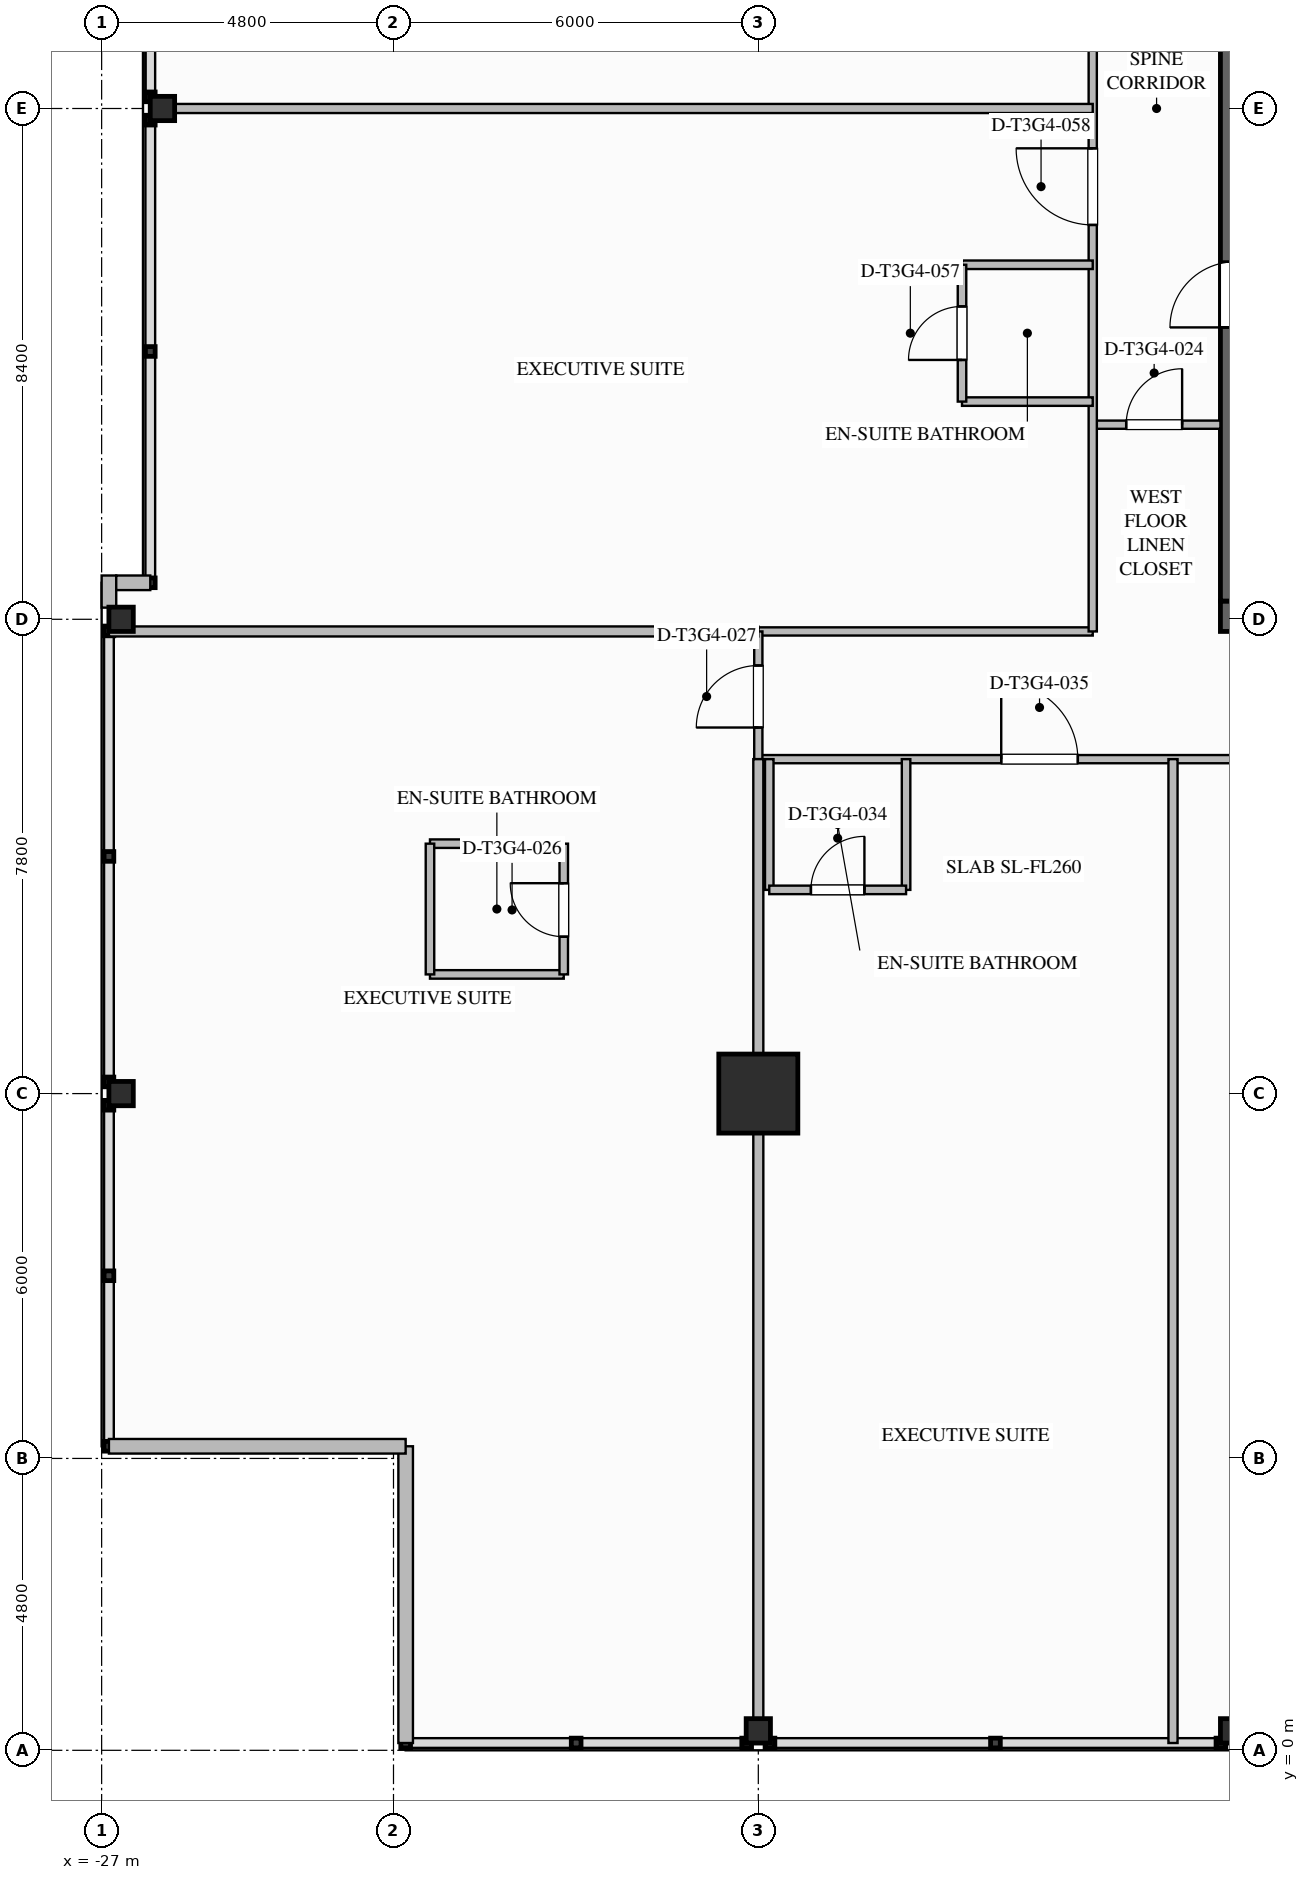
"""IFC4 building model, lengths in metres.
Left out: names, types, materials, properties, quantities, classifications, styles, units other than length and angle.
Written with IfcOpenShell. Run it as: python <this file> out.ifc"""

import sys

from ifc_helpers import new_model, si_unit, direction, frame, frame_2d, origin, origin_2d, place, context, subcontext, project, spatial, rectangle, i_section, extrude, element, fill, save


model = new_model("IFC4")
c1 = context("Model", 3, precision=1e-05, world=origin(), true_north=direction((0.0, 1.0)))
c2 = subcontext(c1, "Body", "Model", "MODEL_VIEW")
j1 = project(units=[si_unit("LENGTHUNIT", "METRE"), si_unit("PLANEANGLEUNIT", "RADIAN")], contexts=[c1])
p1 = place(None, origin())
s1 = spatial("IfcSite", under=j1, at=p1, CompositionType="ELEMENT")
p2 = place(p1, origin())
s2 = spatial("IfcBuilding", under=s1, at=p2, CompositionType="ELEMENT")
p3 = place(p2, frame((0.0, 0.0, 182.35)))
s3 = spatial("IfcBuildingStorey", under=s2, at=p3, CompositionType="ELEMENT", Elevation=182.35)
p4 = place(p3, frame((8.6, 18.65, 0.0), z_axis=(0.0, 0.0, 1.0), x_axis=(-1.0, 0.0, 0.0)))
e1 = element("IfcWall", 1, at=p4, inside=s3, PredefinedType="SHEAR", context=c2, shape_type="SweptSolid", body=[
    extrude(rectangle(XDim=17.2, YDim=0.5, at=frame_2d((8.6, 0.0))), origin(), (0.0, 0.0, 1.0), 3.55),
])
p5 = place(p3, frame((-8.35, 18.9, 0.0), z_axis=(0.0, 0.0, 1.0), x_axis=(0.0, 1.0, 0.0)))
e2 = element("IfcWall", 2, at=p5, inside=s3, PredefinedType="SHEAR", context=c2, shape_type="SweptSolid", body=[
    extrude(rectangle(XDim=16.2, YDim=0.5, at=frame_2d((8.1, 0.0))), origin(), (0.0, 0.0, 1.0), 3.55),
])
p6 = place(p5, frame((12.02, 0.0, 0.0)))
e3 = element("IfcOpeningElement", 3, at=p6, cuts=e2, PredefinedType="OPENING", context=c2, shape_type="SweptSolid", body=[
    extrude(rectangle(XDim=1.08, YDim=2.04, at=frame_2d((0.54, 1.02))), frame((0.0, 0.26, 0.0), z_axis=(0.0, -1.0, 0.0), x_axis=(1.0, 0.0, 0.0)), (0.0, 0.0, 1.0), 0.52),
])
p7 = place(p5, frame((4.5, 0.0, 0.0)))
e4 = element("IfcOpeningElement", 4, at=p7, cuts=e2, PredefinedType="OPENING", context=c2, shape_type="SweptSolid", body=[
    extrude(rectangle(XDim=1.08, YDim=2.04, at=frame_2d((0.54, 1.02))), frame((0.0, 0.26, 0.0), z_axis=(0.0, -1.0, 0.0), x_axis=(1.0, 0.0, 0.0)), (0.0, 0.0, 1.0), 0.52),
])
p8 = place(p3, frame((-16.2, 10.8, 0.0), z_axis=(0.0, 0.0, 1.0), x_axis=(1.0, 0.0, 0.0)))
e5 = element("IfcColumn", 5, at=p8, inside=s3, PredefinedType="COLUMN", context=c2, shape_type="SweptSolid", body=[
    extrude(rectangle(XDim=1.3, YDim=1.3, at=origin_2d()), origin(), (0.0, 0.0, 1.0), 3.55),
])
for number, where, z_axis, x_axis in (
    (6, (-26.68, 10.8, 0.0), (0.0, 0.0, 1.0), (1.0, 0.0, 0.0)),
    (7, (-26.68, 18.6, 0.0), (0.0, 0.0, 1.0), (1.0, 0.0, 0.0)),
    (8, (-26.0, 27.0, 0.0), (0.0, 0.0, 1.0), (1.0, 0.0, 0.0)),
    (9, (-16.2, 0.32, 0.0), (0.0, 0.0, 1.0), (0.0, 1.0, 0.0)),
    (10, (-8.4, 0.32, 0.0), (0.0, 0.0, 1.0), (0.0, 1.0, 0.0)),
):
    element("IfcColumn", number, at=place(p3, frame(where, z_axis=z_axis, x_axis=x_axis)), inside=s3, PredefinedType="COLUMN", context=c2, shape_type="SweptSolid", body=[
        extrude(i_section(OverallWidth=0.401, OverallDepth=0.399, WebThickness=0.025, FlangeThickness=0.04, FilletRadius=0.025, at=origin_2d()), origin(), (0.0, 0.0, 1.0), 3.547),
    ])
p9 = place(p3, frame((-26.88, 18.792, 0.0), z_axis=(0.0, 0.0, 1.0), x_axis=(0.0, 1.0, 0.0)))
e11 = element("IfcWall", 11, at=p9, inside=s3, PredefinedType="STANDARD", context=c2, shape_type="SweptSolid", body=[
    extrude(rectangle(XDim=0.528, YDim=0.24, at=frame_2d((0.264, 0.0))), origin(), (0.0, 0.0, 1.0), 3.29),
])
for number, where, z_axis, x_axis in (
    (12, (-22.0, 0.12, 0.0), (0.0, 0.0, 1.0), (0.0, 1.0, 0.0)),
    (13, (-22.0, 5.0, 0.0), (0.0, 0.0, 1.0), (-1.0, 0.0, 0.0)),
):
    element("IfcWall", number, at=place(p3, frame(where, z_axis=z_axis, x_axis=x_axis)), inside=s3, PredefinedType="STANDARD", context=c2, shape_type="SweptSolid", body=[
        extrude(rectangle(XDim=4.88, YDim=0.24, at=frame_2d((2.44, 0.0))), origin(), (0.0, 0.0, 1.0), 3.29),
    ])
p10 = place(p3, frame((-26.76, 19.2, 0.0), z_axis=(0.0, 0.0, 1.0), x_axis=(1.0, 0.0, 0.0)))
e14 = element("IfcWall", 14, at=p10, inside=s3, PredefinedType="STANDARD", context=c2, shape_type="SweptSolid", body=[
    extrude(rectangle(XDim=0.56, YDim=0.24, at=frame_2d((0.28, 0.0))), origin(), (0.0, 0.0, 1.0), 3.29),
])
p11 = place(p3, frame((-10.7, 21.8, 0.0), z_axis=(0.0, 0.0, 1.0), x_axis=(1.0, 0.0, 0.0)))
e15 = element("IfcWall", 15, at=p11, inside=s3, PredefinedType="PARTITIONING", context=c2, shape_type="SweptSolid", body=[
    extrude(rectangle(XDim=2.1, YDim=0.135, at=frame_2d((1.05, 0.0))), origin(), (0.0, 0.0, 1.0), 3.29),
])
p12 = place(p11, frame((0.55, 0.0, 0.0)))
e16 = element("IfcOpeningElement", 16, at=p12, cuts=e15, PredefinedType="OPENING", context=c2, shape_type="SweptSolid", body=[
    extrude(rectangle(XDim=0.92, YDim=2.1, at=frame_2d((0.46, 1.05))), frame((0.0, 0.077, 0.0), z_axis=(0.0, -1.0, 0.0), x_axis=(1.0, 0.0, 0.0)), (0.0, 0.0, 1.0), 0.155),
])
p13 = place(p3, frame((-16.2, 18.4, 0.0), z_axis=(0.0, 0.0, 1.0), x_axis=(1.0, 0.0, 0.0)))
e17 = element("IfcWall", 17, at=p13, inside=s3, PredefinedType="PARTITIONING", context=c2, shape_type="SweptSolid", body=[
    extrude(rectangle(XDim=5.5, YDim=0.135, at=frame_2d((2.75, 0.0))), origin(), (0.0, 0.0, 1.0), 2.667),
])
p14 = place(p3, frame((-16.2, 16.3, 0.0), z_axis=(0.0, 0.0, 1.0), x_axis=(1.0, 0.0, 0.0)))
e18 = element("IfcWall", 18, at=p14, inside=s3, PredefinedType="PARTITIONING", context=c2, shape_type="SweptSolid", body=[
    extrude(rectangle(XDim=24.8, YDim=0.135, at=frame_2d((12.4, 0.0))), origin(), (0.0, 0.0, 1.0), 3.29),
])
p15 = place(p14, frame((3.995, 0.0, 0.0)))
e19 = element("IfcOpeningElement", 19, at=p15, cuts=e18, PredefinedType="OPENING", context=c2, shape_type="SweptSolid", body=[
    extrude(rectangle(XDim=1.26, YDim=2.2, at=frame_2d((0.63, 1.1))), frame((0.0, 0.077, 0.0), z_axis=(0.0, -1.0, 0.0), x_axis=(1.0, 0.0, 0.0)), (0.0, 0.0, 1.0), 0.155),
])
p16 = place(p14, frame((11.27, 0.0, 0.0)))
e20 = element("IfcOpeningElement", 20, at=p16, cuts=e18, PredefinedType="OPENING", context=c2, shape_type="SweptSolid", body=[
    extrude(rectangle(XDim=1.02, YDim=2.15, at=frame_2d((0.51, 1.075))), frame((0.0, 0.077, 0.0), z_axis=(0.0, -1.0, 0.0), x_axis=(1.0, 0.0, 0.0)), (0.0, 0.0, 1.0), 0.155),
])
p17 = place(p14, frame((21.355, 0.0, 0.0)))
e21 = element("IfcOpeningElement", 21, at=p17, cuts=e18, PredefinedType="OPENING", context=c2, shape_type="SweptSolid", body=[
    extrude(rectangle(XDim=1.26, YDim=2.2, at=frame_2d((0.63, 1.1))), frame((0.0, 0.077, 0.0), z_axis=(0.0, -1.0, 0.0), x_axis=(1.0, 0.0, 0.0)), (0.0, 0.0, 1.0), 0.155),
])
p18 = place(p3, frame((-10.7, 18.4, 0.0), z_axis=(0.0, 0.0, 1.0), x_axis=(0.0, 1.0, 0.0)))
e22 = element("IfcWall", 22, at=p18, inside=s3, PredefinedType="PARTITIONING", context=c2, shape_type="SweptSolid", body=[
    extrude(rectangle(XDim=17.2, YDim=0.135, at=frame_2d((8.6, 0.0))), origin(), (0.0, 0.0, 1.0), 3.29),
])
p19 = place(p18, frame((6.685, 0.0, 0.0)))
e23 = element("IfcOpeningElement", 23, at=p19, cuts=e22, PredefinedType="OPENING", context=c2, shape_type="SweptSolid", body=[
    extrude(rectangle(XDim=1.26, YDim=2.2, at=frame_2d((0.63, 1.1))), frame((0.0, 0.077, 0.0), z_axis=(0.0, -1.0, 0.0), x_axis=(1.0, 0.0, 0.0)), (0.0, 0.0, 1.0), 0.155),
])
p20 = place(p18, frame((10.59, 0.0, 0.0)))
e24 = element("IfcOpeningElement", 24, at=p20, cuts=e22, PredefinedType="OPENING", context=c2, shape_type="SweptSolid", body=[
    extrude(rectangle(XDim=1.02, YDim=2.15, at=frame_2d((0.51, 1.075))), frame((0.0, 0.077, 0.0), z_axis=(0.0, -1.0, 0.0), x_axis=(1.0, 0.0, 0.0)), (0.0, 0.0, 1.0), 0.155),
])
p21 = place(p3, frame((-16.2, 16.3, 0.0), z_axis=(0.0, 0.0, 1.0), x_axis=(0.0, 1.0, 0.0)))
e25 = element("IfcWall", 25, at=p21, inside=s3, PredefinedType="PARTITIONING", context=c2, shape_type="SweptSolid", body=[
    extrude(rectangle(XDim=2.1, YDim=0.135, at=frame_2d((1.05, 0.0))), origin(), (0.0, 0.0, 1.0), 2.579),
])
p22 = place(p21, frame((0.52, 0.0, 0.0)))
e26 = element("IfcOpeningElement", 26, at=p22, cuts=e25, PredefinedType="OPENING", context=c2, shape_type="SweptSolid", body=[
    extrude(rectangle(XDim=1.02, YDim=2.15, at=frame_2d((0.51, 1.075))), frame((0.0, 0.077, 0.0), z_axis=(0.0, -1.0, 0.0), x_axis=(1.0, 0.0, 0.0)), (0.0, 0.0, 1.0), 0.155),
])
p23 = place(p3, frame((-16.2, 0.12, 0.0), z_axis=(0.0, 0.0, 1.0), x_axis=(0.0, 1.0, 0.0)))
e27 = element("IfcWall", 27, at=p23, inside=s3, PredefinedType="PARTITIONING", context=c2, shape_type="SweptSolid", body=[
    extrude(rectangle(XDim=16.18, YDim=0.165, at=frame_2d((8.09, 0.0))), origin(), (0.0, 0.0, 1.0), 2.579),
])
p24 = place(p3, frame((-26.88, 18.4, 0.0), z_axis=(0.0, 0.0, 1.0), x_axis=(1.0, 0.0, 0.0)))
e28 = element("IfcWall", 28, at=p24, inside=s3, PredefinedType="PARTITIONING", context=c2, shape_type="SweptSolid", body=[
    extrude(rectangle(XDim=10.68, YDim=0.165, at=frame_2d((5.34, 0.0))), origin(), (0.0, 0.0, 1.0), 2.579),
])
for number, where, z_axis, x_axis in (
    (29, (-21.6, 12.76, 0.0), (0.0, 0.0, 1.0), (1.0, 0.0, 0.0)),
    (30, (-21.6, 14.91, 0.0), (0.0, 0.0, 1.0), (1.0, 0.0, 0.0)),
):
    element("IfcWall", number, at=place(p3, frame(where, z_axis=z_axis, x_axis=x_axis)), inside=s3, PredefinedType="PLUMBINGWALL", context=c2, shape_type="SweptSolid", body=[
        extrude(rectangle(XDim=2.2, YDim=0.14, at=frame_2d((1.1, 0.0))), origin(), (0.0, 0.0, 1.0), 3.29),
    ])
p25 = place(p3, frame((-21.6, 12.76, 0.0), z_axis=(0.0, 0.0, 1.0), x_axis=(0.0, 1.0, 0.0)))
e31 = element("IfcWall", 31, at=p25, inside=s3, PredefinedType="PLUMBINGWALL", context=c2, shape_type="SweptSolid", body=[
    extrude(rectangle(XDim=2.15, YDim=0.14, at=frame_2d((1.075, 0.0))), origin(), (0.0, 0.0, 1.0), 3.29),
])
p26 = place(p3, frame((-19.4, 12.76, 0.0), z_axis=(0.0, 0.0, 1.0), x_axis=(0.0, 1.0, 0.0)))
e32 = element("IfcWall", 32, at=p26, inside=s3, PredefinedType="PLUMBINGWALL", context=c2, shape_type="SweptSolid", body=[
    extrude(rectangle(XDim=2.15, YDim=0.14, at=frame_2d((1.075, 0.0))), origin(), (0.0, 0.0, 1.0), 3.29),
])
p27 = place(p26, frame((0.62, 0.0, 0.0)))
e33 = element("IfcOpeningElement", 33, at=p27, cuts=e32, PredefinedType="OPENING", context=c2, shape_type="SweptSolid", body=[
    extrude(rectangle(XDim=0.88, YDim=2.1, at=frame_2d((0.44, 1.05))), frame((0.0, 0.08, 0.0), z_axis=(0.0, -1.0, 0.0), x_axis=(1.0, 0.0, 0.0)), (0.0, 0.0, 1.0), 0.16),
])
p28 = place(p3, frame((-16.02, 16.3, 0.0), z_axis=(0.0, 0.0, 1.0), x_axis=(0.0, -1.0, 0.0)))
e34 = element("IfcWall", 34, at=p28, inside=s3, PredefinedType="PLUMBINGWALL", context=c2, shape_type="SweptSolid", body=[
    extrude(rectangle(XDim=2.15, YDim=0.14, at=frame_2d((1.075, 0.0))), origin(), (0.0, 0.0, 1.0), 2.579),
])
p29 = place(p3, frame((-13.77, 16.3, 0.0), z_axis=(0.0, 0.0, 1.0), x_axis=(0.0, -1.0, 0.0)))
e35 = element("IfcWall", 35, at=p29, inside=s3, PredefinedType="PLUMBINGWALL", context=c2, shape_type="SweptSolid", body=[
    extrude(rectangle(XDim=2.15, YDim=0.14, at=frame_2d((1.075, 0.0))), origin(), (0.0, 0.0, 1.0), 3.29),
])
p30 = place(p3, frame((-16.02, 14.15, 0.0), z_axis=(0.0, 0.0, 1.0), x_axis=(1.0, 0.0, 0.0)))
e36 = element("IfcWall", 36, at=p30, inside=s3, PredefinedType="PLUMBINGWALL", context=c2, shape_type="SweptSolid", body=[
    extrude(rectangle(XDim=2.25, YDim=0.14, at=frame_2d((1.125, 0.0))), origin(), (0.0, 0.0, 1.0), 3.29),
])
p31 = place(p30, frame((0.685, 0.0, 0.0)))
e37 = element("IfcOpeningElement", 37, at=p31, cuts=e36, PredefinedType="OPENING", context=c2, shape_type="SweptSolid", body=[
    extrude(rectangle(XDim=0.88, YDim=2.1, at=frame_2d((0.44, 1.05))), frame((0.0, 0.08, 0.0), z_axis=(0.0, -1.0, 0.0), x_axis=(1.0, 0.0, 0.0)), (0.0, 0.0, 1.0), 0.16),
])
p32 = place(p3, frame((-9.38, 0.12, 0.0), z_axis=(0.0, 0.0, 1.0), x_axis=(0.0, 1.0, 0.0)))
e38 = element("IfcWall", 38, at=p32, inside=s3, PredefinedType="PARTITIONING", context=c2, shape_type="SweptSolid", body=[
    extrude(rectangle(XDim=16.18, YDim=0.15, at=frame_2d((8.09, 0.0))), origin(), (0.0, 0.0, 1.0), 3.29),
])
p33 = place(p3, frame((-26.2, 27.0, 0.0), z_axis=(0.0, 0.0, 1.0), x_axis=(1.0, 0.0, 0.0)))
e39 = element("IfcWall", 39, at=p33, inside=s3, PredefinedType="PARTITIONING", context=c2, shape_type="SweptSolid", body=[
    extrude(rectangle(XDim=15.5, YDim=0.15, at=frame_2d((7.75, 0.0))), origin(), (0.0, 0.0, 1.0), 2.579),
])
for number, where, z_axis, x_axis in (
    (40, (-10.7, 22.18, 0.0), (0.0, 0.0, 1.0), (-1.0, 0.0, 0.0)),
    (41, (-10.7, 24.43, 0.0), (0.0, 0.0, 1.0), (-1.0, 0.0, 0.0)),
):
    element("IfcWall", number, at=place(p3, frame(where, z_axis=z_axis, x_axis=x_axis)), inside=s3, PredefinedType="PLUMBINGWALL", context=c2, shape_type="SweptSolid", body=[
        extrude(rectangle(XDim=2.15, YDim=0.14, at=frame_2d((1.075, 0.0))), origin(), (0.0, 0.0, 1.0), 3.29),
    ])
p34 = place(p3, frame((-12.85, 22.18, 0.0), z_axis=(0.0, 0.0, 1.0), x_axis=(0.0, 1.0, 0.0)))
e42 = element("IfcWall", 42, at=p34, inside=s3, PredefinedType="PLUMBINGWALL", context=c2, shape_type="SweptSolid", body=[
    extrude(rectangle(XDim=2.25, YDim=0.14, at=frame_2d((1.125, 0.0))), origin(), (0.0, 0.0, 1.0), 3.29),
])
p35 = place(p34, frame((0.685, 0.0, 0.0)))
e43 = element("IfcOpeningElement", 43, at=p35, cuts=e42, PredefinedType="OPENING", context=c2, shape_type="SweptSolid", body=[
    extrude(rectangle(XDim=0.88, YDim=2.1, at=frame_2d((0.44, 1.05))), frame((0.0, 0.08, 0.0), z_axis=(0.0, -1.0, 0.0), x_axis=(1.0, 0.0, 0.0)), (0.0, 0.0, 1.0), 0.16),
])
p36 = place(p12, origin())
e44 = element("IfcDoor", 44, at=p36, inside=s3, OperationType="SINGLE_SWING_RIGHT", PredefinedType="DOOR", context=c2, shape_type="SweptSolid", body=[
    extrude(rectangle(XDim=0.92, YDim=2.1, at=frame_2d((0.46, 1.05))), frame((0.0, 0.025, 0.0), z_axis=(0.0, -1.0, 0.0), x_axis=(1.0, 0.0, 0.0)), (0.0, 0.0, 1.0), 0.05),
])
fill(e16, e44)
p37 = place(p27, origin())
e45 = element("IfcDoor", 45, at=p37, inside=s3, OperationType="SINGLE_SWING_RIGHT", PredefinedType="DOOR", context=c2, shape_type="SweptSolid", body=[
    extrude(rectangle(XDim=0.88, YDim=2.1, at=frame_2d((0.44, 1.05))), frame((0.0, 0.025, 0.0), z_axis=(0.0, -1.0, 0.0), x_axis=(1.0, 0.0, 0.0)), (0.0, 0.0, 1.0), 0.05),
])
fill(e33, e45)
p38 = place(p22, origin())
e46 = element("IfcDoor", 46, at=p38, inside=s3, OperationType="SINGLE_SWING_LEFT", PredefinedType="DOOR", context=c2, shape_type="SweptSolid", body=[
    extrude(rectangle(XDim=1.02, YDim=2.15, at=frame_2d((0.51, 1.075))), frame((0.0, 0.025, 0.0), z_axis=(0.0, -1.0, 0.0), x_axis=(1.0, 0.0, 0.0)), (0.0, 0.0, 1.0), 0.05),
])
fill(e26, e46)
p39 = place(p31, origin())
e47 = element("IfcDoor", 47, at=p39, inside=s3, OperationType="SINGLE_SWING_RIGHT", PredefinedType="DOOR", context=c2, shape_type="SweptSolid", body=[
    extrude(rectangle(XDim=0.88, YDim=2.1, at=frame_2d((0.44, 1.05))), frame((0.0, 0.025, 0.0), z_axis=(0.0, -1.0, 0.0), x_axis=(1.0, 0.0, 0.0)), (0.0, 0.0, 1.0), 0.05),
])
fill(e37, e47)
p40 = place(p15, origin())
e48 = element("IfcDoor", 48, at=p40, inside=s3, OperationType="SINGLE_SWING_LEFT", PredefinedType="DOOR", context=c2, shape_type="SweptSolid", body=[
    extrude(rectangle(XDim=1.26, YDim=2.2, at=frame_2d((0.63, 1.1))), frame((0.0, 0.025, 0.0), z_axis=(0.0, -1.0, 0.0), x_axis=(1.0, 0.0, 0.0)), (0.0, 0.0, 1.0), 0.05),
])
fill(e19, e48)
p41 = place(p35, origin())
e49 = element("IfcDoor", 49, at=p41, inside=s3, OperationType="SINGLE_SWING_LEFT", PredefinedType="DOOR", context=c2, shape_type="SweptSolid", body=[
    extrude(rectangle(XDim=0.88, YDim=2.1, at=frame_2d((0.44, 1.05))), frame((0.0, 0.025, 0.0), z_axis=(0.0, -1.0, 0.0), x_axis=(1.0, 0.0, 0.0)), (0.0, 0.0, 1.0), 0.05),
])
fill(e43, e49)
p42 = place(p19, origin())
e50 = element("IfcDoor", 50, at=p42, inside=s3, OperationType="SINGLE_SWING_RIGHT", PredefinedType="DOOR", context=c2, shape_type="SweptSolid", body=[
    extrude(rectangle(XDim=1.26, YDim=2.2, at=frame_2d((0.63, 1.1))), frame((0.0, 0.025, 0.0), z_axis=(0.0, -1.0, 0.0), x_axis=(1.0, 0.0, 0.0)), (0.0, 0.0, 1.0), 0.05),
])
fill(e23, e50)
save(model, sys.argv[1])
